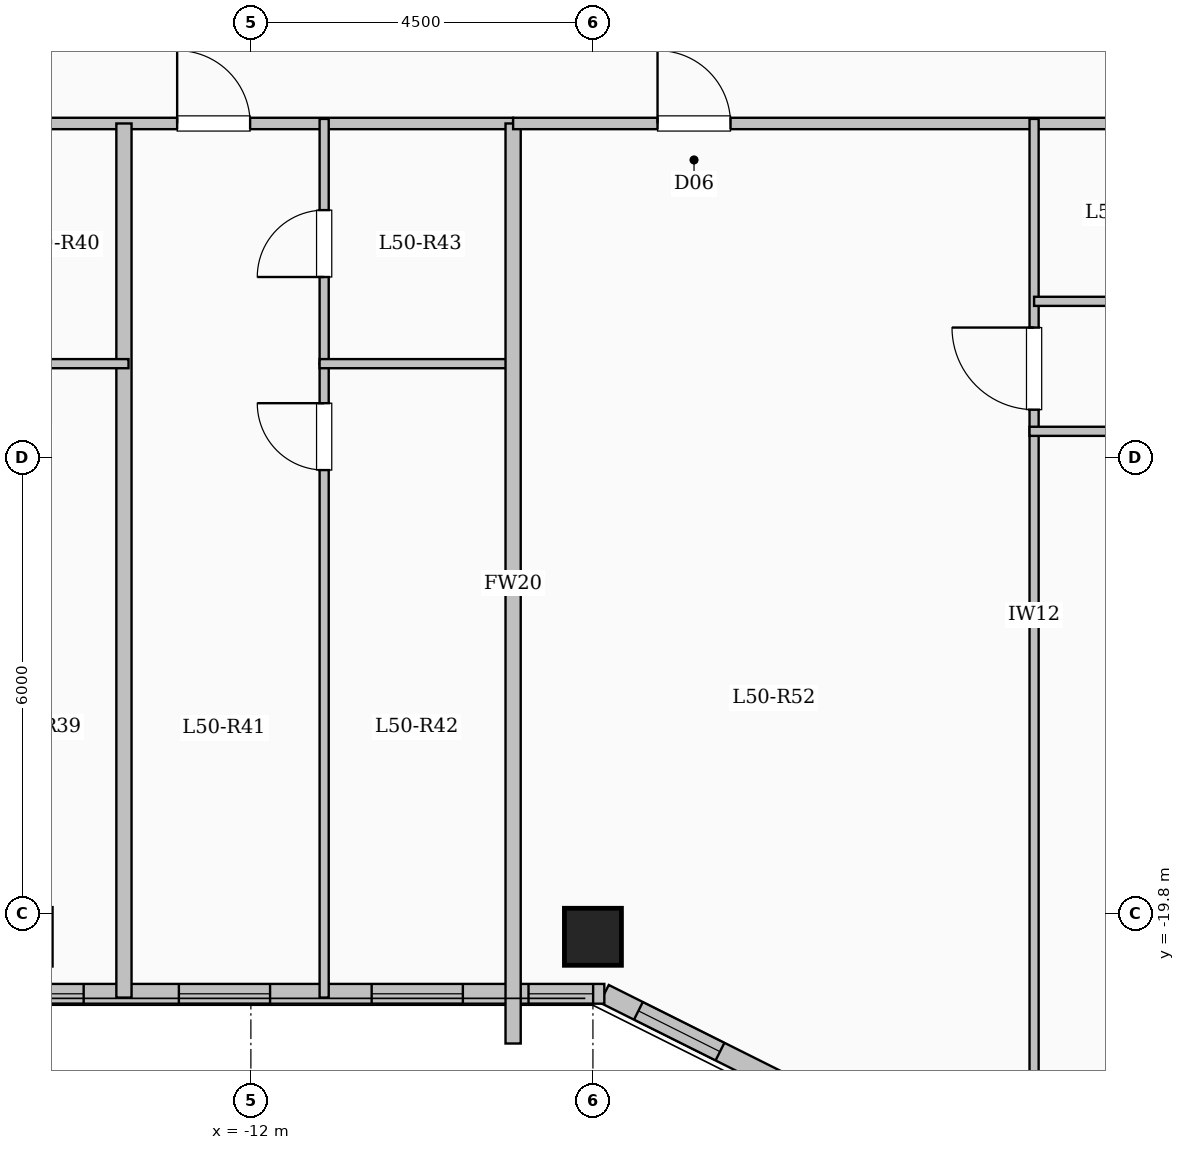
"""IFC4 building model, lengths in metres.
Left out: names, types, materials, properties, quantities, classifications, styles, units other than length and angle.
Written with IfcOpenShell. Run it as: python <this file> out.ifc"""

import sys

from ifc_helpers import new_model, si_unit, direction, frame, frame_2d, origin, origin_2d, place, context, subcontext, project, spatial, rectangle, extrude, element, fill, save


model = new_model("IFC4")
c1 = context("Model", 3, precision=1e-05, world=origin(), true_north=direction((0.0, 1.0)))
c2 = subcontext(c1, "Body", "Model", "MODEL_VIEW")
j1 = project(units=[si_unit("LENGTHUNIT", "METRE"), si_unit("PLANEANGLEUNIT", "RADIAN")], contexts=[c1])
p1 = place(None, origin())
s1 = spatial("IfcSite", under=j1, at=p1, CompositionType="ELEMENT")
p2 = place(p1, origin())
s2 = spatial("IfcBuilding", under=s1, at=p2, CompositionType="ELEMENT")
p3 = place(p2, frame((0.0, 0.0, 186.9)))
s3 = spatial("IfcBuildingStorey", under=s2, at=p3, CompositionType="ELEMENT", Elevation=186.9)
p4 = place(p3, frame((-7.5, -20.1, 0.0), z_axis=(0.0, 0.0, 1.0), x_axis=(1.0, 0.0, 0.0)))
e1 = element("IfcColumn", 1, at=p4, inside=s3, PredefinedType="COLUMN", context=c2, shape_type="SweptSolid", body=[
    extrude(rectangle(XDim=0.75, YDim=0.75, at=origin_2d()), origin(), (0.0, 0.0, 1.0), 3.35),
])
p5 = place(p3, frame((-4.35, -22.35, 0.0), z_axis=(0.0, 0.0, 1.0), x_axis=(-0.894427191, 0.4472135955, 0.0)))
e2 = element("IfcWall", 2, at=p5, inside=s3, PredefinedType="SOLIDWALL", context=c2, shape_type="SweptSolid", body=[
    extrude(rectangle(XDim=3.354, YDim=0.26, at=frame_2d((1.677, 0.0))), origin(), (0.0, 0.0, 1.0), 3.1),
])
p6 = place(p5, frame((1.653, 0.0, 0.95)))
e3 = element("IfcOpeningElement", 3, at=p6, cuts=e2, PredefinedType="OPENING", context=c2, shape_type="SweptSolid", body=[
    extrude(rectangle(XDim=1.2, YDim=1.5, at=frame_2d((0.6, 0.75))), frame((0.0, 0.14, 0.0), z_axis=(0.0, -1.0, 0.0), x_axis=(1.0, 0.0, 0.0)), (0.0, 0.0, 1.0), 0.28),
])
p7 = place(p3, frame((-7.35, -20.85, 0.0), z_axis=(0.0, 0.0, 1.0), x_axis=(-1.0, 0.0, 0.0)))
e4 = element("IfcWall", 4, at=p7, inside=s3, PredefinedType="SOLIDWALL", context=c2, shape_type="SweptSolid", body=[
    extrude(rectangle(XDim=11.1, YDim=0.26, at=frame_2d((5.55, 0.0))), origin(), (0.0, 0.0, 1.0), 3.1),
])
p8 = place(p7, frame((0.147, 0.0, 0.95)))
e5 = element("IfcOpeningElement", 5, at=p8, cuts=e4, PredefinedType="OPENING", context=c2, shape_type="SweptSolid", body=[
    extrude(rectangle(XDim=0.85, YDim=1.5, at=frame_2d((0.425, 0.75))), frame((0.0, 0.14, 0.0), z_axis=(0.0, -1.0, 0.0), x_axis=(1.0, 0.0, 0.0)), (0.0, 0.0, 1.0), 0.28),
])
p9 = place(p7, frame((1.861, 0.0, 0.95)))
e6 = element("IfcOpeningElement", 6, at=p9, cuts=e4, PredefinedType="OPENING", context=c2, shape_type="SweptSolid", body=[
    extrude(rectangle(XDim=1.2, YDim=1.5, at=frame_2d((0.6, 0.75))), frame((0.0, 0.14, 0.0), z_axis=(0.0, -1.0, 0.0), x_axis=(1.0, 0.0, 0.0)), (0.0, 0.0, 1.0), 0.28),
])
p10 = place(p7, frame((4.397, 0.0, 0.95)))
e7 = element("IfcOpeningElement", 7, at=p10, cuts=e4, PredefinedType="OPENING", context=c2, shape_type="SweptSolid", body=[
    extrude(rectangle(XDim=1.2, YDim=1.5, at=frame_2d((0.6, 0.75))), frame((0.0, 0.14, 0.0), z_axis=(0.0, -1.0, 0.0), x_axis=(1.0, 0.0, 0.0)), (0.0, 0.0, 1.0), 0.28),
])
p11 = place(p7, frame((6.85, 0.0, 0.95)))
e8 = element("IfcOpeningElement", 8, at=p11, cuts=e4, PredefinedType="OPENING", context=c2, shape_type="SweptSolid", body=[
    extrude(rectangle(XDim=1.2, YDim=1.5, at=frame_2d((0.6, 0.75))), frame((0.0, 0.14, 0.0), z_axis=(0.0, -1.0, 0.0), x_axis=(1.0, 0.0, 0.0)), (0.0, 0.0, 1.0), 0.28),
])
p12 = place(p7, frame((9.194, 0.0, 0.95)))
e9 = element("IfcOpeningElement", 9, at=p12, cuts=e4, PredefinedType="OPENING", context=c2, shape_type="SweptSolid", body=[
    extrude(rectangle(XDim=1.2, YDim=1.5, at=frame_2d((0.6, 0.75))), frame((0.0, 0.14, 0.0), z_axis=(0.0, -1.0, 0.0), x_axis=(1.0, 0.0, 0.0)), (0.0, 0.0, 1.0), 0.28),
])
p13 = place(p3, frame((-18.35, -9.4, 0.0), z_axis=(0.0, 0.0, 1.0), x_axis=(1.0, 0.0, 0.0)))
e10 = element("IfcWall", 10, at=p13, inside=s3, PredefinedType="PARTITIONING", context=c2, shape_type="SweptSolid", body=[
    extrude(rectangle(XDim=9.8, YDim=0.15, at=frame_2d((4.9, 0.0))), origin(), (0.0, 0.0, 1.0), 3.1),
])
p14 = place(p13, frame((0.7, 0.0, 0.0)))
e11 = element("IfcOpeningElement", 11, at=p14, cuts=e10, PredefinedType="OPENING", context=c2, shape_type="SweptSolid", body=[
    extrude(rectangle(XDim=0.96, YDim=2.15, at=frame_2d((0.48, 1.075))), frame((0.0, 0.085, 0.0), z_axis=(0.0, -1.0, 0.0), x_axis=(1.0, 0.0, 0.0)), (0.0, 0.0, 1.0), 0.17),
])
p15 = place(p13, frame((5.38, 0.0, 0.0)))
e12 = element("IfcOpeningElement", 12, at=p15, cuts=e10, PredefinedType="OPENING", context=c2, shape_type="SweptSolid", body=[
    extrude(rectangle(XDim=0.96, YDim=2.15, at=frame_2d((0.48, 1.075))), frame((0.0, 0.085, 0.0), z_axis=(0.0, -1.0, 0.0), x_axis=(1.0, 0.0, 0.0)), (0.0, 0.0, 1.0), 0.17),
])
p16 = place(p3, frame((-13.67, -20.9, 0.0), z_axis=(0.0, 0.0, 1.0), x_axis=(0.0, 1.0, 0.0)))
e13 = element("IfcWall", 13, at=p16, inside=s3, PredefinedType="SOLIDWALL", context=c2, shape_type="SweptSolid", body=[
    extrude(rectangle(XDim=11.5, YDim=0.2, at=frame_2d((5.75, 0.0))), origin(), (0.0, 0.0, 1.0), 3.1),
])
p17 = place(p3, frame((-15.95, -12.56, 0.0), z_axis=(0.0, 0.0, 1.0), x_axis=(1.0, 0.0, 0.0)))
e14 = element("IfcWall", 14, at=p17, inside=s3, PredefinedType="PARTITIONING", context=c2, shape_type="SweptSolid", body=[
    extrude(rectangle(XDim=2.34, YDim=0.12, at=frame_2d((1.17, 0.0))), origin(), (0.0, 0.0, 1.0), 2.725),
])
p18 = place(p3, frame((-11.036, -20.9, 0.0), z_axis=(0.0, 0.0, 1.0), x_axis=(0.0, 1.0, 0.0)))
e15 = element("IfcWall", 15, at=p18, inside=s3, PredefinedType="PARTITIONING", context=c2, shape_type="SweptSolid", body=[
    extrude(rectangle(XDim=8.34, YDim=0.12, at=frame_2d((4.17, 0.0))), origin(), (0.0, 0.0, 1.0), 3.1),
])
p19 = place(p18, frame((6.94, 0.0, 0.0)))
e16 = element("IfcOpeningElement", 16, at=p19, cuts=e15, PredefinedType="OPENING", context=c2, shape_type="SweptSolid", body=[
    extrude(rectangle(XDim=0.88, YDim=2.1, at=frame_2d((0.44, 1.05))), frame((0.0, 0.07, 0.0), z_axis=(0.0, -1.0, 0.0), x_axis=(1.0, 0.0, 0.0)), (0.0, 0.0, 1.0), 0.14),
])
p20 = place(p3, frame((-11.036, -12.56, 0.0), z_axis=(0.0, 0.0, 1.0), x_axis=(0.0, 1.0, 0.0)))
e17 = element("IfcWall", 17, at=p20, inside=s3, PredefinedType="PARTITIONING", context=c2, shape_type="SweptSolid", body=[
    extrude(rectangle(XDim=3.22, YDim=0.12, at=frame_2d((1.61, 0.0))), origin(), (0.0, 0.0, 1.0), 3.1),
])
p21 = place(p20, frame((1.14, 0.0, 0.0)))
e18 = element("IfcOpeningElement", 18, at=p21, cuts=e17, PredefinedType="OPENING", context=c2, shape_type="SweptSolid", body=[
    extrude(rectangle(XDim=0.88, YDim=2.1, at=frame_2d((0.44, 1.05))), frame((0.0, 0.07, 0.0), z_axis=(0.0, -1.0, 0.0), x_axis=(1.0, 0.0, 0.0)), (0.0, 0.0, 1.0), 0.14),
])
p22 = place(p3, frame((-11.096, -12.56, 0.0), z_axis=(0.0, 0.0, 1.0), x_axis=(1.0, 0.0, 0.0)))
e19 = element("IfcWall", 19, at=p22, inside=s3, PredefinedType="PARTITIONING", context=c2, shape_type="SweptSolid", body=[
    extrude(rectangle(XDim=2.556, YDim=0.12, at=frame_2d((1.278, 0.0))), origin(), (0.0, 0.0, 1.0), 2.725),
])
p23 = place(p3, frame((-8.55, -21.504, 0.0), z_axis=(0.0, 0.0, 1.0), x_axis=(0.0, 1.0, 0.0)))
e20 = element("IfcWall", 20, at=p23, inside=s3, PredefinedType="SOLIDWALL", context=c2, shape_type="SweptSolid", body=[
    extrude(rectangle(XDim=12.104, YDim=0.2, at=frame_2d((6.052, 0.0))), origin(), (0.0, 0.0, 1.0), 3.1),
])
p24 = place(p3, frame((-8.55, -9.4, 0.0), z_axis=(0.0, 0.0, 1.0), x_axis=(1.0, 0.0, 0.0)))
e21 = element("IfcWall", 21, at=p24, inside=s3, PredefinedType="PARTITIONING", context=c2, shape_type="SweptSolid", body=[
    extrude(rectangle(XDim=17.1, YDim=0.15, at=frame_2d((8.55, 0.0))), origin(), (0.0, 0.0, 1.0), 3.1),
])
p25 = place(p24, frame((1.9, 0.0, 0.0)))
e22 = element("IfcOpeningElement", 22, at=p25, cuts=e21, PredefinedType="OPENING", context=c2, shape_type="SweptSolid", body=[
    extrude(rectangle(XDim=0.96, YDim=2.15, at=frame_2d((0.48, 1.075))), frame((0.0, 0.085, 0.0), z_axis=(0.0, -1.0, 0.0), x_axis=(1.0, 0.0, 0.0)), (0.0, 0.0, 1.0), 0.17),
])
p26 = place(p3, frame((-1.696, -22.38, 0.0), z_axis=(0.0, 0.0, 1.0), x_axis=(0.0, 1.0, 0.0)))
e23 = element("IfcWall", 23, at=p26, inside=s3, PredefinedType="PARTITIONING", context=c2, shape_type="SweptSolid", body=[
    extrude(rectangle(XDim=13.04, YDim=0.12, at=frame_2d((6.52, 0.0))), origin(), (0.0, 0.0, 1.0), 3.1),
])
p27 = place(p26, frame((9.215, 0.0, 0.0)))
e24 = element("IfcOpeningElement", 24, at=p27, cuts=e23, PredefinedType="OPENING", context=c2, shape_type="SweptSolid", body=[
    extrude(rectangle(XDim=1.08, YDim=2.15, at=frame_2d((0.54, 1.075))), frame((0.0, 0.07, 0.0), z_axis=(0.0, -1.0, 0.0), x_axis=(1.0, 0.0, 0.0)), (0.0, 0.0, 1.0), 0.14),
])
p28 = place(p3, frame((-1.696, -11.74, 0.0), z_axis=(0.0, 0.0, 1.0), x_axis=(1.0, 0.0, 0.0)))
e25 = element("IfcWall", 25, at=p28, inside=s3, PredefinedType="PARTITIONING", context=c2, shape_type="SweptSolid", body=[
    extrude(rectangle(XDim=5.393, YDim=0.12, at=frame_2d((2.697, 0.0))), origin(), (0.0, 0.0, 1.0), 3.1),
])
p29 = place(p28, frame((2.256, 0.0, 0.0)))
e26 = element("IfcOpeningElement", 26, at=p29, cuts=e25, PredefinedType="OPENING", context=c2, shape_type="SweptSolid", body=[
    extrude(rectangle(XDim=0.88, YDim=2.1, at=frame_2d((0.44, 1.05))), frame((0.0, 0.07, 0.0), z_axis=(0.0, -1.0, 0.0), x_axis=(1.0, 0.0, 0.0)), (0.0, 0.0, 1.0), 0.14),
])
p30 = place(p3, frame((-1.756, -13.45, 0.0), z_axis=(0.0, 0.0, 1.0), x_axis=(1.0, 0.0, 0.0)))
e27 = element("IfcWall", 27, at=p30, inside=s3, PredefinedType="PARTITIONING", context=c2, shape_type="SweptSolid", body=[
    extrude(rectangle(XDim=10.366, YDim=0.12, at=frame_2d((5.183, 0.0))), origin(), (0.0, 0.0, 1.0), 3.1),
])
p31 = place(p30, frame((1.256, 0.0, 0.0)))
e28 = element("IfcOpeningElement", 28, at=p31, cuts=e27, PredefinedType="OPENING", context=c2, shape_type="SweptSolid", body=[
    extrude(rectangle(XDim=0.88, YDim=2.1, at=frame_2d((0.44, 1.05))), frame((0.0, 0.07, 0.0), z_axis=(0.0, -1.0, 0.0), x_axis=(1.0, 0.0, 0.0)), (0.0, 0.0, 1.0), 0.14),
])
p32 = place(p30, frame((4.648, 0.0, 0.0)))
e29 = element("IfcOpeningElement", 29, at=p32, cuts=e27, PredefinedType="OPENING", context=c2, shape_type="SweptSolid", body=[
    extrude(rectangle(XDim=0.88, YDim=2.1, at=frame_2d((0.44, 1.05))), frame((0.0, 0.07, 0.0), z_axis=(0.0, -1.0, 0.0), x_axis=(1.0, 0.0, 0.0)), (0.0, 0.0, 1.0), 0.14),
])
p33 = place(p30, frame((8.04, 0.0, 0.0)))
e30 = element("IfcOpeningElement", 30, at=p33, cuts=e27, PredefinedType="OPENING", context=c2, shape_type="SweptSolid", body=[
    extrude(rectangle(XDim=0.88, YDim=2.1, at=frame_2d((0.44, 1.05))), frame((0.0, 0.07, 0.0), z_axis=(0.0, -1.0, 0.0), x_axis=(1.0, 0.0, 0.0)), (0.0, 0.0, 1.0), 0.14),
])
p34 = place(p6, origin())
e31 = element("IfcWindow", 31, at=p34, inside=s3, PartitioningType="SINGLE_PANEL", PredefinedType="WINDOW", context=c2, shape_type="SweptSolid", body=[
    extrude(rectangle(XDim=1.2, YDim=1.5, at=frame_2d((0.6, 0.75))), frame((0.0, 0.03, 0.0), z_axis=(0.0, -1.0, 0.0), x_axis=(1.0, 0.0, 0.0)), (0.0, 0.0, 1.0), 0.06),
])
fill(e3, e31)
p35 = place(p8, origin())
e32 = element("IfcWindow", 32, at=p35, inside=s3, PartitioningType="SINGLE_PANEL", PredefinedType="WINDOW", context=c2, shape_type="SweptSolid", body=[
    extrude(rectangle(XDim=0.85, YDim=1.5, at=frame_2d((0.425, 0.75))), frame((0.0, 0.03, 0.0), z_axis=(0.0, -1.0, 0.0), x_axis=(1.0, 0.0, 0.0)), (0.0, 0.0, 1.0), 0.06),
])
fill(e5, e32)
p36 = place(p9, origin())
e33 = element("IfcWindow", 33, at=p36, inside=s3, PartitioningType="SINGLE_PANEL", PredefinedType="WINDOW", context=c2, shape_type="SweptSolid", body=[
    extrude(rectangle(XDim=1.2, YDim=1.5, at=frame_2d((0.6, 0.75))), frame((0.0, 0.03, 0.0), z_axis=(0.0, -1.0, 0.0), x_axis=(1.0, 0.0, 0.0)), (0.0, 0.0, 1.0), 0.06),
])
fill(e6, e33)
p37 = place(p10, origin())
e34 = element("IfcWindow", 34, at=p37, inside=s3, PartitioningType="SINGLE_PANEL", PredefinedType="WINDOW", context=c2, shape_type="SweptSolid", body=[
    extrude(rectangle(XDim=1.2, YDim=1.5, at=frame_2d((0.6, 0.75))), frame((0.0, 0.03, 0.0), z_axis=(0.0, -1.0, 0.0), x_axis=(1.0, 0.0, 0.0)), (0.0, 0.0, 1.0), 0.06),
])
fill(e7, e34)
p38 = place(p11, origin())
e35 = element("IfcWindow", 35, at=p38, inside=s3, PartitioningType="SINGLE_PANEL", PredefinedType="WINDOW", context=c2, shape_type="SweptSolid", body=[
    extrude(rectangle(XDim=1.2, YDim=1.5, at=frame_2d((0.6, 0.75))), frame((0.0, 0.03, 0.0), z_axis=(0.0, -1.0, 0.0), x_axis=(1.0, 0.0, 0.0)), (0.0, 0.0, 1.0), 0.06),
])
fill(e8, e35)
p39 = place(p15, origin())
e36 = element("IfcDoor", 36, at=p39, inside=s3, OperationType="SINGLE_SWING_LEFT", PredefinedType="DOOR", context=c2, shape_type="SweptSolid", body=[
    extrude(rectangle(XDim=0.96, YDim=2.15, at=frame_2d((0.48, 1.075))), frame((0.0, 0.025, 0.0), z_axis=(0.0, -1.0, 0.0), x_axis=(1.0, 0.0, 0.0)), (0.0, 0.0, 1.0), 0.05),
])
fill(e12, e36)
p40 = place(p19, origin())
e37 = element("IfcDoor", 37, at=p40, inside=s3, OperationType="SINGLE_SWING_RIGHT", PredefinedType="DOOR", context=c2, shape_type="SweptSolid", body=[
    extrude(rectangle(XDim=0.88, YDim=2.1, at=frame_2d((0.44, 1.05))), frame((0.0, 0.025, 0.0), z_axis=(0.0, -1.0, 0.0), x_axis=(1.0, 0.0, 0.0)), (0.0, 0.0, 1.0), 0.05),
])
fill(e16, e37)
p41 = place(p21, origin())
e38 = element("IfcDoor", 38, at=p41, inside=s3, OperationType="SINGLE_SWING_LEFT", PredefinedType="DOOR", context=c2, shape_type="SweptSolid", body=[
    extrude(rectangle(XDim=0.88, YDim=2.1, at=frame_2d((0.44, 1.05))), frame((0.0, 0.025, 0.0), z_axis=(0.0, -1.0, 0.0), x_axis=(1.0, 0.0, 0.0)), (0.0, 0.0, 1.0), 0.05),
])
fill(e18, e38)
p42 = place(p25, origin())
e39 = element("IfcDoor", 39, at=p42, inside=s3, OperationType="SINGLE_SWING_LEFT", PredefinedType="DOOR", context=c2, shape_type="SweptSolid", body=[
    extrude(rectangle(XDim=0.96, YDim=2.15, at=frame_2d((0.48, 1.075))), frame((0.0, 0.025, 0.0), z_axis=(0.0, -1.0, 0.0), x_axis=(1.0, 0.0, 0.0)), (0.0, 0.0, 1.0), 0.05),
])
fill(e22, e39)
p43 = place(p27, origin())
e40 = element("IfcDoor", 40, at=p43, inside=s3, OperationType="SINGLE_SWING_RIGHT", PredefinedType="DOOR", context=c2, shape_type="SweptSolid", body=[
    extrude(rectangle(XDim=1.08, YDim=2.15, at=frame_2d((0.54, 1.075))), frame((0.0, 0.025, 0.0), z_axis=(0.0, -1.0, 0.0), x_axis=(1.0, 0.0, 0.0)), (0.0, 0.0, 1.0), 0.05),
])
fill(e24, e40)
save(model, sys.argv[1])
